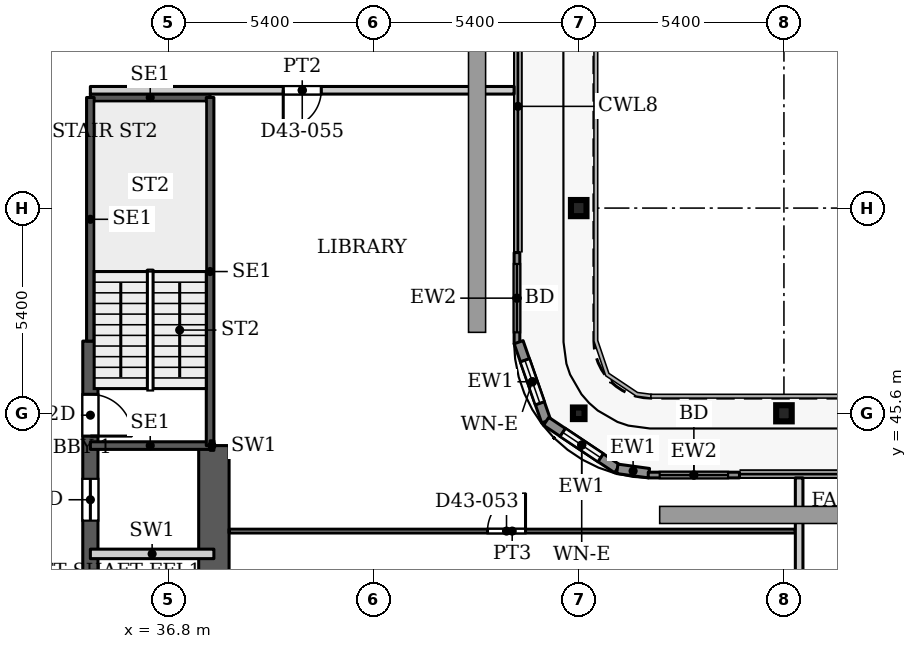
"""IFC4 building model, lengths in metres.
Left out: names, types, materials, properties, quantities, classifications, styles, units other than length and angle.
Written with IfcOpenShell. Run it as: python <this file> out.ifc"""

import sys

from ifc_helpers import new_model, si_unit, direction, frame, frame_2d, origin, origin_2d, place, context, subcontext, project, spatial, rectangle, hollow_rectangle, i_section, extrude, source, transform, mapped, element, fill, save


model = new_model("IFC4")
c1 = context("Model", 3, precision=1e-05, world=origin(), true_north=direction((0.0, 1.0)))
c2 = subcontext(c1, "Body", "Model", "MODEL_VIEW")
j1 = project(units=[si_unit("LENGTHUNIT", "METRE"), si_unit("PLANEANGLEUNIT", "RADIAN")], contexts=[c1])
p1 = place(None, origin())
s1 = spatial("IfcSite", under=j1, at=p1, CompositionType="ELEMENT")
p2 = place(p1, origin())
s2 = spatial("IfcBuilding", under=s1, at=p2, CompositionType="ELEMENT")
p3 = place(p2, frame((0.0, 0.0, 187.7)))
s3 = spatial("IfcBuildingStorey", under=s2, at=p3, CompositionType="ELEMENT", Elevation=187.7)
for number, where, z_axis, x_axis in (
    (1, (53.0, 45.6, 0.0), (0.0, 0.0, 1.0), (1.0, 0.0, 0.0)),
    (2, (47.6, 51.0, 0.0), (0.0, 0.0, 1.0), (1.0, 0.0, 0.0)),
):
    element("IfcColumn", number, at=place(p3, frame(where, z_axis=z_axis, x_axis=x_axis)), inside=s3, PredefinedType="COLUMN", context=c2, shape_type="SweptSolid", body=[
        extrude(i_section(OverallWidth=0.409, OverallDepth=0.425, WebThickness=0.033, FlangeThickness=0.052, FilletRadius=0.013, at=origin_2d()), origin(), (0.0, 0.0, 1.0), 3.9),
    ])
p4 = place(p3, frame((47.6, 45.6, 0.0), z_axis=(0.0, 0.0, 1.0), x_axis=(1.0, 0.0, 0.0)))
e3 = element("IfcColumn", 3, at=p4, inside=s3, PredefinedType="COLUMN", context=c2, shape_type="SweptSolid", body=[
    extrude(hollow_rectangle(XDim=0.305, YDim=0.305, WallThickness=0.016, InnerFilletRadius=0.016, OuterFilletRadius=0.032, at=origin_2d()), origin(), (0.0, 0.0, 1.0), 3.9),
])
p5 = place(p3, frame((34.75, 29.05, 0.0), z_axis=(0.0, 0.0, 1.0), x_axis=(0.0, 1.0, 0.0)))
e4 = element("IfcWall", 4, at=p5, inside=s3, PredefinedType="SHEAR", context=c2, shape_type="SweptSolid", body=[
    extrude(rectangle(XDim=18.45, YDim=0.4, at=frame_2d((9.225, 0.0))), origin(), (0.0, 0.0, 1.0), 3.9),
])
p6 = place(p5, frame((8.025, 0.0, 0.0)))
e5 = element("IfcOpeningElement", 5, at=p6, cuts=e4, PredefinedType="OPENING", context=c2, shape_type="SweptSolid", body=[
    extrude(rectangle(XDim=1.1, YDim=2.2, at=frame_2d((0.55, 1.1))), frame((0.0, 0.21, 0.0), z_axis=(0.0, -1.0, 0.0), x_axis=(1.0, 0.0, 0.0)), (0.0, 0.0, 1.0), 0.42),
])
p7 = place(p5, frame((10.875, 0.0, 0.0)))
e6 = element("IfcOpeningElement", 6, at=p7, cuts=e4, PredefinedType="OPENING", context=c2, shape_type="SweptSolid", body=[
    extrude(rectangle(XDim=1.1, YDim=2.2, at=frame_2d((0.55, 1.1))), frame((0.0, 0.21, 0.0), z_axis=(0.0, -1.0, 0.0), x_axis=(1.0, 0.0, 0.0)), (0.0, 0.0, 1.0), 0.42),
])
p8 = place(p5, frame((13.725, 0.0, 0.0)))
e7 = element("IfcOpeningElement", 7, at=p8, cuts=e4, PredefinedType="OPENING", context=c2, shape_type="SweptSolid", body=[
    extrude(rectangle(XDim=1.1, YDim=2.2, at=frame_2d((0.55, 1.1))), frame((0.0, 0.21, 0.0), z_axis=(0.0, -1.0, 0.0), x_axis=(1.0, 0.0, 0.0)), (0.0, 0.0, 1.0), 0.42),
])
p9 = place(p5, frame((15.95, 0.0, 0.0)))
e8 = element("IfcOpeningElement", 8, at=p9, cuts=e4, PredefinedType="OPENING", context=c2, shape_type="SweptSolid", body=[
    extrude(rectangle(XDim=1.1, YDim=2.2, at=frame_2d((0.55, 1.1))), frame((0.0, 0.21, 0.0), z_axis=(0.0, -1.0, 0.0), x_axis=(1.0, 0.0, 0.0)), (0.0, 0.0, 1.0), 0.42),
])
p10 = place(p3, frame((38.0, 36.2, 0.0), z_axis=(0.0, 0.0, 1.0), x_axis=(0.0, 1.0, 0.0)))
e9 = element("IfcWall", 9, at=p10, inside=s3, PredefinedType="SHEAR", context=c2, shape_type="SweptSolid", body=[
    extrude(rectangle(XDim=8.55, YDim=0.8, at=frame_2d((4.275, 0.0))), origin(), (0.0, 0.0, 1.0), 3.9),
])
p11 = place(p3, frame((45.975, 49.83, 0.0), z_axis=(0.0, 0.0, 1.0), x_axis=(0.0, -1.0, 0.0)))
e10 = element("IfcWall", 10, at=p11, inside=s3, PredefinedType="SOLIDWALL", context=c2, shape_type="SweptSolid", body=[
    extrude(rectangle(XDim=2.4, YDim=0.15, at=frame_2d((1.2, 0.0))), origin(), (0.0, 0.0, 1.0), 3.75),
])
p12 = place(p11, frame((0.3, 0.0, 0.0)))
e11 = element("IfcOpeningElement", 11, at=p12, cuts=e10, PredefinedType="OPENING", context=c2, shape_type="SweptSolid", body=[
    extrude(rectangle(XDim=1.8, YDim=2.4, at=frame_2d((0.9, 1.2))), frame((0.0, 0.085, 0.0), z_axis=(0.0, -1.0, 0.0), x_axis=(1.0, 0.0, 0.0)), (0.0, 0.0, 1.0), 0.17),
])
p13 = place(p3, frame((46.018, 47.471, 0.0), z_axis=(0.0, 0.0, 1.0), x_axis=(0.328791208903, -0.944402637093, 0.0)))
e12 = element("IfcWall", 12, at=p13, inside=s3, PredefinedType="SOLIDWALL", context=c2, shape_type="SweptSolid", body=[
    extrude(rectangle(XDim=2.205, YDim=0.25, at=frame_2d((1.102, 0.0))), origin(), (0.0, 0.0, 1.0), 3.75),
])
p14 = place(p13, frame((0.503, 0.0, 0.6)))
e13 = element("IfcOpeningElement", 13, at=p14, cuts=e12, PredefinedType="OPENING", context=c2, shape_type="SweptSolid", body=[
    extrude(rectangle(XDim=1.2, YDim=2.1, at=frame_2d((0.6, 1.05))), frame((0.0, 0.135, 0.0), z_axis=(0.0, -1.0, 0.0), x_axis=(1.0, 0.0, 0.0)), (0.0, 0.0, 1.0), 0.27),
])
p15 = place(p3, frame((46.743, 45.389, 0.0), z_axis=(0.0, 0.0, 1.0), x_axis=(0.831449265529, -0.555600682912, 0.0)))
e14 = element("IfcWall", 14, at=p15, inside=s3, PredefinedType="SOLIDWALL", context=c2, shape_type="SweptSolid", body=[
    extrude(rectangle(XDim=2.251, YDim=0.25, at=frame_2d((1.126, 0.0))), origin(), (0.0, 0.0, 1.0), 3.75),
])
p16 = place(p15, frame((0.525, 0.0, 0.6)))
e15 = element("IfcOpeningElement", 15, at=p16, cuts=e14, PredefinedType="OPENING", context=c2, shape_type="SweptSolid", body=[
    extrude(rectangle(XDim=1.2, YDim=2.1, at=frame_2d((0.6, 1.05))), frame((0.0, 0.135, 0.0), z_axis=(0.0, -1.0, 0.0), x_axis=(1.0, 0.0, 0.0)), (0.0, 0.0, 1.0), 0.27),
])
p17 = place(p3, frame((48.615, 44.138, 0.0), z_axis=(0.0, 0.0, 1.0), x_axis=(0.990741504246, -0.135761819977, 0.0)))
e16 = element("IfcWall", 16, at=p17, inside=s3, PredefinedType="SOLIDWALL", context=c2, shape_type="SweptSolid", body=[
    extrude(rectangle(XDim=0.84, YDim=0.25, at=frame_2d((0.42, 0.0))), origin(), (0.0, 0.0, 1.0), 3.75),
])
p18 = place(p3, frame((49.43, 43.975, 0.0), z_axis=(0.0, 0.0, 1.0), x_axis=(1.0, 0.0, 0.0)))
e17 = element("IfcWall", 17, at=p18, inside=s3, PredefinedType="SOLIDWALL", context=c2, shape_type="SweptSolid", body=[
    extrude(rectangle(XDim=2.4, YDim=0.15, at=frame_2d((1.2, 0.0))), origin(), (0.0, 0.0, 1.0), 3.75),
])
p19 = place(p18, frame((0.3, 0.0, 0.0)))
e18 = element("IfcOpeningElement", 18, at=p19, cuts=e17, PredefinedType="OPENING", context=c2, shape_type="SweptSolid", body=[
    extrude(rectangle(XDim=1.8, YDim=2.4, at=frame_2d((0.9, 1.2))), frame((0.0, 0.085, 0.0), z_axis=(0.0, -1.0, 0.0), x_axis=(1.0, 0.0, 0.0)), (0.0, 0.0, 1.0), 0.17),
])
for number, where, z_axis, x_axis in (
    (19, (34.75, 44.75, 0.0), (0.0, 0.0, 1.0), (1.0, 0.0, 0.0)),
    (20, (34.75, 53.91, 0.0), (0.0, 0.0, 1.0), (1.0, 0.0, 0.0)),
):
    element("IfcWall", number, at=place(p3, frame(where, z_axis=z_axis, x_axis=x_axis)), inside=s3, PredefinedType="SHEAR", context=c2, shape_type="SweptSolid", body=[
        extrude(rectangle(XDim=3.15, YDim=0.2, at=frame_2d((1.575, 0.0))), origin(), (0.0, 0.0, 1.0), 3.9),
    ])
p20 = place(p3, frame((34.75, 47.5, 0.0), z_axis=(0.0, 0.0, 1.0), x_axis=(0.0, 1.0, 0.0)))
e21 = element("IfcWall", 21, at=p20, inside=s3, PredefinedType="SHEAR", context=c2, shape_type="SweptSolid", body=[
    extrude(rectangle(XDim=6.41, YDim=0.2, at=frame_2d((3.205, 0.0))), origin(), (0.0, 0.0, 1.0), 3.9),
])
p21 = place(p3, frame((37.9, 44.75, 0.0), z_axis=(0.0, 0.0, 1.0), x_axis=(0.0, 1.0, 0.0)))
e22 = element("IfcWall", 22, at=p21, inside=s3, PredefinedType="SHEAR", context=c2, shape_type="SweptSolid", body=[
    extrude(rectangle(XDim=9.16, YDim=0.2, at=frame_2d((4.58, 0.0))), origin(), (0.0, 0.0, 1.0), 3.9),
])
p22 = place(p3, frame((34.75, 41.9, 0.0), z_axis=(0.0, 0.0, 1.0), x_axis=(1.0, 0.0, 0.0)))
e23 = element("IfcWall", 23, at=p22, inside=s3, PredefinedType="PARTITIONING", context=c2, shape_type="SweptSolid", body=[
    extrude(rectangle(XDim=3.25, YDim=0.25, at=frame_2d((1.625, 0.0))), origin(), (0.0, 0.0, 1.0), 3.9),
])
p23 = place(p3, frame((37.9, 44.75, 0.0), z_axis=(0.0, 0.0, 1.0), x_axis=(1.0, 0.0, 0.0)))
e24 = element("IfcWall", 24, at=p23, inside=s3, PredefinedType="PARTITIONING", context=c2, shape_type="SweptSolid", body=[
    extrude(rectangle(XDim=0.1, YDim=0.25, at=frame_2d((0.05, 0.0))), origin(), (0.0, 0.0, 1.0), 3.9),
])
p24 = place(p3, frame((34.75, 54.1, 0.0), z_axis=(0.0, 0.0, 1.0), x_axis=(1.0, 0.0, 0.0)))
e25 = element("IfcWall", 25, at=p24, inside=s3, PredefinedType="PARTITIONING", context=c2, shape_type="SweptSolid", body=[
    extrude(rectangle(XDim=11.15, YDim=0.2, at=frame_2d((5.575, 0.0))), origin(), (0.0, 0.0, 1.0), 3.6),
])
p25 = place(p24, frame((5.075, 0.0, 0.0)))
e26 = element("IfcOpeningElement", 26, at=p25, cuts=e25, PredefinedType="OPENING", context=c2, shape_type="SweptSolid", body=[
    extrude(rectangle(XDim=1.0, YDim=2.1, at=frame_2d((0.5, 1.05))), frame((0.0, 0.11, 0.0), z_axis=(0.0, -1.0, 0.0), x_axis=(1.0, 0.0, 0.0)), (0.0, 0.0, 1.0), 0.22),
])
p26 = place(p3, frame((38.399, 42.5, 0.0), z_axis=(0.0, 0.0, 1.0), x_axis=(1.0, 0.0, 0.0)))
e27 = element("IfcWall", 27, at=p26, inside=s3, PredefinedType="PARTITIONING", context=c2, shape_type="SweptSolid", body=[
    extrude(rectangle(XDim=14.901, YDim=0.1, at=frame_2d((7.451, 0.0))), origin(), (0.0, 0.0, 1.0), 3.6),
])
p27 = place(p26, frame((6.801, 0.0, 0.0)))
e28 = element("IfcOpeningElement", 28, at=p27, cuts=e27, PredefinedType="OPENING", context=c2, shape_type="SweptSolid", body=[
    extrude(rectangle(XDim=1.0, YDim=2.1, at=frame_2d((0.5, 1.05))), frame((0.0, 0.06, 0.0), z_axis=(0.0, -1.0, 0.0), x_axis=(1.0, 0.0, 0.0)), (0.0, 0.0, 1.0), 0.12),
])
p28 = place(p3, frame((53.4, 36.199, 0.0), z_axis=(0.0, 0.0, 1.0), x_axis=(0.0, 1.0, 0.0)))
e29 = element("IfcWall", 29, at=p28, inside=s3, PredefinedType="PARTITIONING", context=c2, shape_type="SweptSolid", body=[
    extrude(rectangle(XDim=7.701, YDim=0.2, at=frame_2d((3.851, 0.0))), origin(), (0.0, 0.0, 1.0), 3.6),
])
m1 = source(origin(), c2, "Body", "SweptSolid", [
    extrude(rectangle(XDim=1.8, YDim=2.4, at=frame_2d((0.9, 1.2))), frame((0.0, 0.025, 0.0), z_axis=(0.0, -1.0, 0.0), x_axis=(1.0, 0.0, 0.0)), (0.0, 0.0, 1.0), 0.05),
])
p29 = place(p12, origin())
e30 = element("IfcDoor", 30, at=p29, inside=s3, OperationType="SLIDING_TO_LEFT", PredefinedType="DOOR", context=c2, shape_type="MappedRepresentation", body=[
    mapped(m1, transform((0.0, 0.0, 0.0), x_axis=(1.0, 0.0, 0.0), y_axis=(0.0, 1.0, 0.0), z_axis=(0.0, 0.0, 1.0), scale=1.0)),
])
fill(e11, e30)
m2 = source(origin(), c2, "Body", "SweptSolid", [
    extrude(rectangle(XDim=1.2, YDim=2.1, at=frame_2d((0.6, 1.05))), frame((0.0, 0.03, 0.0), z_axis=(0.0, -1.0, 0.0), x_axis=(1.0, 0.0, 0.0)), (0.0, 0.0, 1.0), 0.06),
])
p30 = place(p14, origin())
e31 = element("IfcWindow", 31, at=p30, inside=s3, PartitioningType="SINGLE_PANEL", PredefinedType="WINDOW", context=c2, shape_type="MappedRepresentation", body=[
    mapped(m2, transform((0.0, 0.0, 0.0), x_axis=(1.0, 0.0, 0.0), y_axis=(0.0, 1.0, 0.0), z_axis=(0.0, 0.0, 1.0), scale=1.0)),
])
fill(e13, e31)
p31 = place(p16, origin())
e32 = element("IfcWindow", 32, at=p31, inside=s3, PartitioningType="SINGLE_PANEL", PredefinedType="WINDOW", context=c2, shape_type="MappedRepresentation", body=[
    mapped(m2, transform((0.0, 0.0, 0.0), x_axis=(1.0, 0.0, 0.0), y_axis=(0.0, 1.0, 0.0), z_axis=(0.0, 0.0, 1.0), scale=1.0)),
])
fill(e15, e32)
p32 = place(p19, origin())
e33 = element("IfcDoor", 33, at=p32, inside=s3, OperationType="SLIDING_TO_LEFT", PredefinedType="DOOR", context=c2, shape_type="MappedRepresentation", body=[
    mapped(m1, transform((0.0, 0.0, 0.0), x_axis=(1.0, 0.0, 0.0), y_axis=(0.0, 1.0, 0.0), z_axis=(0.0, 0.0, 1.0), scale=1.0)),
])
fill(e18, e33)
m3 = source(origin(), c2, "Body", "SweptSolid", [
    extrude(rectangle(XDim=1.1, YDim=2.2, at=frame_2d((0.55, 1.1))), frame((0.0, 0.025, 0.0), z_axis=(0.0, -1.0, 0.0), x_axis=(1.0, 0.0, 0.0)), (0.0, 0.0, 1.0), 0.05),
])
p33 = place(p8, origin())
e34 = element("IfcDoor", 34, at=p33, inside=s3, OperationType="SLIDING_TO_LEFT", PredefinedType="DOOR", context=c2, shape_type="MappedRepresentation", body=[
    mapped(m3, transform((0.0, 0.0, 0.0), x_axis=(1.0, 0.0, 0.0), y_axis=(0.0, 1.0, 0.0), z_axis=(0.0, 0.0, 1.0), scale=1.0)),
])
fill(e7, e34)
m4 = source(origin(), c2, "Body", "SweptSolid", [
    extrude(rectangle(XDim=1.1, YDim=2.2, at=frame_2d((0.55, 1.1))), frame((0.0, 0.025, 0.0), z_axis=(0.0, -1.0, 0.0), x_axis=(1.0, 0.0, 0.0)), (0.0, 0.0, 1.0), 0.05),
])
p34 = place(p9, origin())
e35 = element("IfcDoor", 35, at=p34, inside=s3, OperationType="SINGLE_SWING_RIGHT", PredefinedType="DOOR", context=c2, shape_type="MappedRepresentation", body=[
    mapped(m4, transform((0.0, 0.0, 0.0), x_axis=(1.0, 0.0, 0.0), y_axis=(0.0, 1.0, 0.0), z_axis=(0.0, 0.0, 1.0), scale=1.0)),
])
fill(e8, e35)
m5 = source(origin(), c2, "Body", "SweptSolid", [
    extrude(rectangle(XDim=1.0, YDim=2.1, at=frame_2d((0.5, 1.05))), frame((0.0, 0.025, 0.0), z_axis=(0.0, -1.0, 0.0), x_axis=(1.0, 0.0, 0.0)), (0.0, 0.0, 1.0), 0.05),
])
p35 = place(p27, origin())
e36 = element("IfcDoor", 36, at=p35, inside=s3, OperationType="SINGLE_SWING_LEFT", PredefinedType="DOOR", context=c2, shape_type="MappedRepresentation", body=[
    mapped(m5, transform((0.0, 0.0, 0.0), x_axis=(1.0, 0.0, 0.0), y_axis=(0.0, 1.0, 0.0), z_axis=(0.0, 0.0, 1.0), scale=1.0)),
])
fill(e28, e36)
m6 = source(origin(), c2, "Body", "SweptSolid", [
    extrude(rectangle(XDim=1.0, YDim=2.1, at=frame_2d((0.5, 1.05))), frame((0.0, 0.025, 0.0), z_axis=(0.0, -1.0, 0.0), x_axis=(1.0, 0.0, 0.0)), (0.0, 0.0, 1.0), 0.05),
])
p36 = place(p25, origin())
e37 = element("IfcDoor", 37, at=p36, inside=s3, OperationType="SINGLE_SWING_RIGHT", PredefinedType="DOOR", context=c2, shape_type="MappedRepresentation", body=[
    mapped(m6, transform((0.0, 0.0, 0.0), x_axis=(1.0, 0.0, 0.0), y_axis=(0.0, 1.0, 0.0), z_axis=(0.0, 0.0, 1.0), scale=1.0)),
])
fill(e26, e37)
save(model, sys.argv[1])
